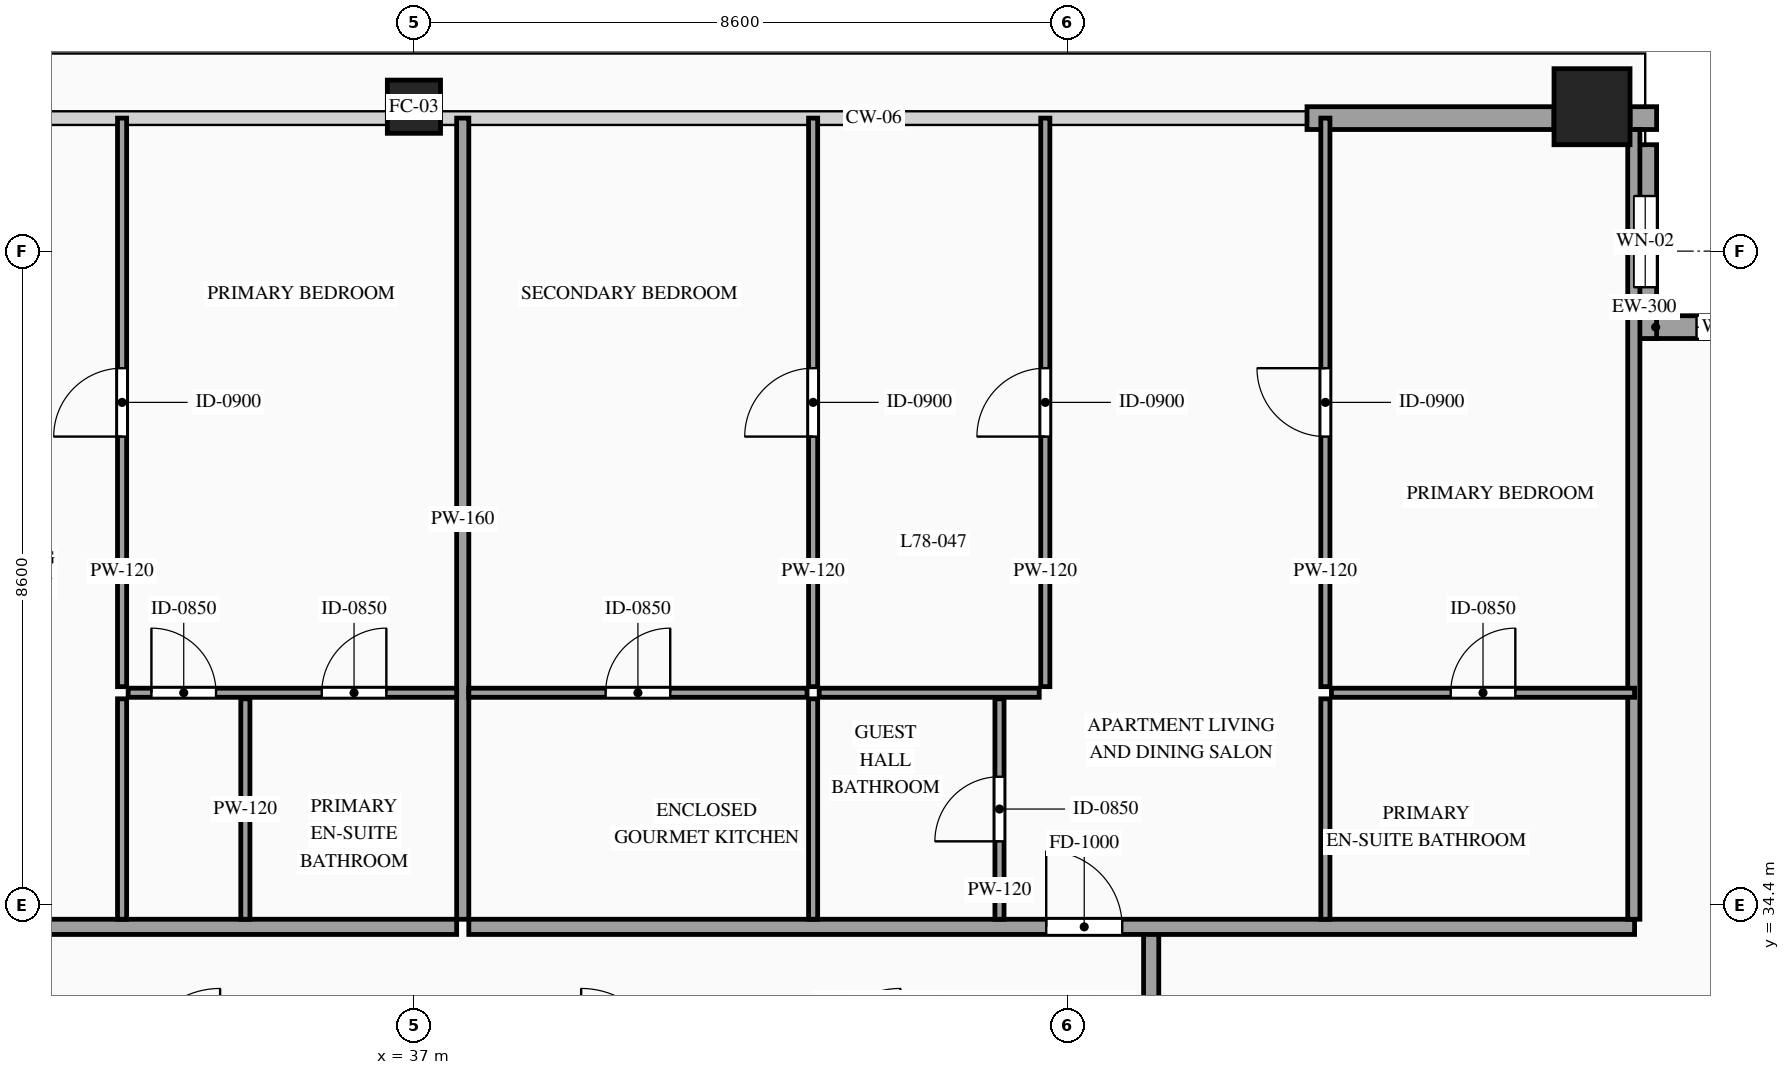
"""IFC4 building model, lengths in metres.
Left out: names, types, materials, properties, quantities, classifications, styles, units other than length and angle.
Written with IfcOpenShell. Run it as: python <this file> out.ifc"""

import sys

from ifc_helpers import new_model, si_unit, direction, frame, frame_2d, origin, origin_2d, place, context, subcontext, project, spatial, rectangle, hollow_rectangle, extrude, source, transform, mapped, element, fill, save


model = new_model("IFC4")
c1 = context("Model", 3, precision=1e-05, world=origin(), true_north=direction((0.0, 1.0)))
c2 = subcontext(c1, "Body", "Model", "MODEL_VIEW")
j1 = project(units=[si_unit("LENGTHUNIT", "METRE"), si_unit("PLANEANGLEUNIT", "RADIAN")], contexts=[c1])
p1 = place(None, origin())
s1 = spatial("IfcSite", under=j1, at=p1, CompositionType="ELEMENT")
p2 = place(p1, origin())
s2 = spatial("IfcBuilding", under=s1, at=p2, CompositionType="ELEMENT")
p3 = place(p2, frame((0.0, 0.0, 292.6)))
s3 = spatial("IfcBuildingStorey", under=s2, at=p3, CompositionType="ELEMENT", Elevation=292.6)
m1 = source(origin(), c2, "Body", "SweptSolid", [
    extrude(hollow_rectangle(XDim=0.7, YDim=0.7, WallThickness=0.032, at=origin_2d()), origin(), (0.0, 0.0, 1.0), 3.5),
])
p4 = place(p3, frame((37.0, 44.9, 0.0), z_axis=(0.0, 0.0, 1.0), x_axis=(1.0, 0.0, 0.0)))
e1 = element("IfcColumn", 1, at=p4, inside=s3, PredefinedType="COLUMN", context=c2, shape_type="MappedRepresentation", body=[
    mapped(m1, transform((0.0, 0.0, 0.0), scale=1.0)),
])
m2 = source(origin(), c2, "Body", "SweptSolid", [
    extrude(hollow_rectangle(XDim=1.0, YDim=1.0, WallThickness=0.048, at=origin_2d()), origin(), (0.0, 0.0, 1.0), 3.5),
])
p5 = place(p3, frame((52.5, 44.9, 0.0), z_axis=(0.0, 0.0, 1.0), x_axis=(1.0, 0.0, 0.0)))
e2 = element("IfcColumn", 2, at=p5, inside=s3, PredefinedType="COLUMN", context=c2, shape_type="MappedRepresentation", body=[
    mapped(m2, transform((0.0, 0.0, 0.0), scale=1.0)),
])
p6 = place(p3, frame((55.6, 42.0, 0.0), z_axis=(0.0, 0.0, 1.0), x_axis=(-1.0, 0.0, 0.0)))
e3 = element("IfcWall", 3, at=p6, inside=s3, PredefinedType="SOLIDWALL", context=c2, shape_type="SweptSolid", body=[
    extrude(rectangle(XDim=2.55, YDim=0.3, at=frame_2d((1.275, 0.0))), origin(), (0.0, 0.0, 1.0), 3.28),
])
p7 = place(p6, frame((0.825, 0.0, 0.85)))
e4 = element("IfcOpeningElement", 4, at=p7, cuts=e3, PredefinedType="OPENING", context=c2, shape_type="SweptSolid", body=[
    extrude(rectangle(XDim=0.9, YDim=1.5, at=frame_2d((0.45, 0.75))), frame((0.0, 0.165, 0.0), z_axis=(0.0, -1.0, 0.0), x_axis=(1.0, 0.0, 0.0)), (0.0, 0.0, 1.0), 0.33),
])
p8 = place(p3, frame((53.2, 41.85, 0.0), z_axis=(0.0, 0.0, 1.0), x_axis=(0.0, 1.0, 0.0)))
e5 = element("IfcWall", 5, at=p8, inside=s3, PredefinedType="SOLIDWALL", context=c2, shape_type="SweptSolid", body=[
    extrude(rectangle(XDim=2.55, YDim=0.3, at=frame_2d((1.275, 0.0))), origin(), (0.0, 0.0, 1.0), 3.28),
])
p9 = place(p8, frame((0.675, 0.0, 0.85)))
e6 = element("IfcOpeningElement", 6, at=p9, cuts=e5, PredefinedType="OPENING", context=c2, shape_type="SweptSolid", body=[
    extrude(rectangle(XDim=1.2, YDim=2.1, at=frame_2d((0.6, 1.05))), frame((0.0, 0.165, 0.0), z_axis=(0.0, -1.0, 0.0), x_axis=(1.0, 0.0, 0.0)), (0.0, 0.0, 1.0), 0.33),
])
m3 = source(origin(), c2, "Body", "SweptSolid", [
    extrude(rectangle(XDim=0.35, YDim=0.3, at=frame_2d((0.175, 0.0))), origin(), (0.0, 0.0, 1.0), 3.28),
])
p10 = place(p3, frame((53.0, 44.75, 0.0), z_axis=(0.0, 0.0, 1.0), x_axis=(1.0, 0.0, 0.0)))
e7 = element("IfcWall", 7, at=p10, inside=s3, PredefinedType="SOLIDWALL", context=c2, shape_type="MappedRepresentation", body=[
    mapped(m3, transform((0.0, 0.0, 0.0), scale=1.0)),
])
m4 = source(origin(), c2, "Body", "SweptSolid", [
    extrude(rectangle(XDim=3.25, YDim=0.3, at=frame_2d((1.625, 0.0))), origin(), (0.0, 0.0, 1.0), 2.885),
])
p11 = place(p3, frame((48.75, 44.75, 0.0), z_axis=(0.0, 0.0, 1.0), x_axis=(1.0, 0.0, 0.0)))
e8 = element("IfcWall", 8, at=p11, inside=s3, PredefinedType="SOLIDWALL", context=c2, shape_type="MappedRepresentation", body=[
    mapped(m4, transform((0.0, 0.0, 0.0), scale=1.0)),
])
m5 = source(origin(), c2, "Body", "SweptSolid", [
    extrude(rectangle(XDim=1.7, YDim=0.2, at=frame_2d((0.85, 0.0))), origin(), (0.0, 0.0, 1.0), 3.28),
])
p12 = place(p3, frame((46.7, 32.35, 0.0), z_axis=(0.0, 0.0, 1.0), x_axis=(0.0, 1.0, 0.0)))
e9 = element("IfcWall", 9, at=p12, inside=s3, PredefinedType="PARTITIONING", context=c2, shape_type="MappedRepresentation", body=[
    mapped(m5, transform((0.0, 0.0, 0.0), scale=1.0)),
])
p13 = place(p3, frame((20.94, 34.11, 0.0), z_axis=(0.0, 0.0, 1.0), x_axis=(1.0, 0.0, 0.0)))
e10 = element("IfcWall", 10, at=p13, inside=s3, PredefinedType="PARTITIONING", context=c2, shape_type="SweptSolid", body=[
    extrude(rectangle(XDim=16.622, YDim=0.2, at=frame_2d((8.311, 0.0))), origin(), (0.0, 0.0, 1.0), 3.28),
])
p14 = place(p13, frame((9.611, 0.0, 0.0)))
e11 = element("IfcOpeningElement", 11, at=p14, cuts=e10, PredefinedType="OPENING", context=c2, shape_type="SweptSolid", body=[
    extrude(rectangle(XDim=1.0, YDim=2.2, at=frame_2d((0.5, 1.1))), frame((0.0, 0.115, 0.0), z_axis=(0.0, -1.0, 0.0), x_axis=(1.0, 0.0, 0.0)), (0.0, 0.0, 1.0), 0.23),
])
m6 = source(origin(), c2, "Body", "SweptSolid", [
    extrude(rectangle(XDim=10.54, YDim=0.16, at=frame_2d((5.27, 0.0))), origin(), (0.0, 0.0, 1.0), 3.28),
])
p15 = place(p3, frame((37.642, 34.21, 0.0), z_axis=(0.0, 0.0, 1.0), x_axis=(0.0, 1.0, 0.0)))
e12 = element("IfcWall", 12, at=p15, inside=s3, PredefinedType="PARTITIONING", context=c2, shape_type="MappedRepresentation", body=[
    mapped(m6, transform((0.0, 0.0, 0.0), scale=1.0)),
])
m7 = source(origin(), c2, "Body", "SweptSolid", [
    extrude(rectangle(XDim=2.9, YDim=0.12, at=frame_2d((1.45, 0.0))), origin(), (0.0, 0.0, 1.0), 3.28),
])
for number, where, z_axis, x_axis in (
    (13, (34.782, 34.21, 0.0), (0.0, 0.0, 1.0), (0.0, 1.0, 0.0)),
    (14, (33.16, 34.21, 0.0), (0.0, 0.0, 1.0), (0.0, 1.0, 0.0)),
):
    element("IfcWall", number, at=place(p3, frame(where, z_axis=z_axis, x_axis=x_axis)), inside=s3, PredefinedType="PARTITIONING", context=c2, shape_type="MappedRepresentation", body=[
        mapped(m7, transform((0.0, 0.0, 0.0), scale=1.0)),
    ])
p16 = place(p3, frame((33.24, 37.19, 0.0), z_axis=(0.0, 0.0, 1.0), x_axis=(1.0, 0.0, 0.0)))
e15 = element("IfcWall", 15, at=p16, inside=s3, PredefinedType="PARTITIONING", context=c2, shape_type="SweptSolid", body=[
    extrude(rectangle(XDim=4.322, YDim=0.12, at=frame_2d((2.161, 0.0))), origin(), (0.0, 0.0, 1.0), 3.28),
])
p17 = place(p16, frame((2.547, 0.0, 0.0)))
e16 = element("IfcOpeningElement", 16, at=p17, cuts=e15, PredefinedType="OPENING", context=c2, shape_type="SweptSolid", body=[
    extrude(rectangle(XDim=0.85, YDim=2.1, at=frame_2d((0.425, 1.05))), frame((0.0, 0.075, 0.0), z_axis=(0.0, -1.0, 0.0), x_axis=(1.0, 0.0, 0.0)), (0.0, 0.0, 1.0), 0.15),
])
p18 = place(p16, frame((0.306, 0.0, 0.0)))
e17 = element("IfcOpeningElement", 17, at=p18, cuts=e15, PredefinedType="OPENING", context=c2, shape_type="SweptSolid", body=[
    extrude(rectangle(XDim=0.85, YDim=2.1, at=frame_2d((0.425, 1.05))), frame((0.0, 0.075, 0.0), z_axis=(0.0, -1.0, 0.0), x_axis=(1.0, 0.0, 0.0)), (0.0, 0.0, 1.0), 0.15),
])
p19 = place(p3, frame((33.16, 37.27, 0.0), z_axis=(0.0, 0.0, 1.0), x_axis=(0.0, 1.0, 0.0)))
e18 = element("IfcWall", 18, at=p19, inside=s3, PredefinedType="PARTITIONING", context=c2, shape_type="SweptSolid", body=[
    extrude(rectangle(XDim=7.48, YDim=0.12, at=frame_2d((3.74, 0.0))), origin(), (0.0, 0.0, 1.0), 3.28),
])
p20 = place(p19, frame((3.29, 0.0, 0.0)))
e19 = element("IfcOpeningElement", 19, at=p20, cuts=e18, PredefinedType="OPENING", context=c2, shape_type="SweptSolid", body=[
    extrude(rectangle(XDim=0.9, YDim=2.15, at=frame_2d((0.45, 1.075))), frame((0.0, 0.075, 0.0), z_axis=(0.0, -1.0, 0.0), x_axis=(1.0, 0.0, 0.0)), (0.0, 0.0, 1.0), 0.15),
])
p21 = place(p3, frame((37.722, 34.11, 0.0), z_axis=(0.0, 0.0, 1.0), x_axis=(1.0, 0.0, 0.0)))
e20 = element("IfcWall", 20, at=p21, inside=s3, PredefinedType="PARTITIONING", context=c2, shape_type="SweptSolid", body=[
    extrude(rectangle(XDim=15.338, YDim=0.2, at=frame_2d((7.669, 0.0))), origin(), (0.0, 0.0, 1.0), 3.28),
])
p22 = place(p21, frame((7.597, 0.0, 0.0)))
e21 = element("IfcOpeningElement", 21, at=p22, cuts=e20, PredefinedType="OPENING", context=c2, shape_type="SweptSolid", body=[
    extrude(rectangle(XDim=1.0, YDim=2.2, at=frame_2d((0.5, 1.1))), frame((0.0, 0.115, 0.0), z_axis=(0.0, -1.0, 0.0), x_axis=(1.0, 0.0, 0.0)), (0.0, 0.0, 1.0), 0.23),
])
m8 = source(origin(), c2, "Body", "SweptSolid", [
    extrude(rectangle(XDim=10.39, YDim=0.16, at=frame_2d((5.195, 0.0))), origin(), (0.0, 0.0, 1.0), 3.28),
])
p23 = place(p3, frame((53.05, 34.21, 0.0), z_axis=(0.0, 0.0, 1.0), x_axis=(0.0, 1.0, 0.0)))
e22 = element("IfcWall", 22, at=p23, inside=s3, PredefinedType="PARTITIONING", context=c2, shape_type="MappedRepresentation", body=[
    mapped(m8, transform((0.0, 0.0, 0.0), scale=1.0)),
])
p24 = place(p3, frame((37.722, 37.19, 0.0), z_axis=(0.0, 0.0, 1.0), x_axis=(1.0, 0.0, 0.0)))
e23 = element("IfcWall", 23, at=p24, inside=s3, PredefinedType="PARTITIONING", context=c2, shape_type="SweptSolid", body=[
    extrude(rectangle(XDim=4.45, YDim=0.12, at=frame_2d((2.225, 0.0))), origin(), (0.0, 0.0, 1.0), 3.28),
])
p25 = place(p24, frame((1.8, 0.0, 0.0)))
e24 = element("IfcOpeningElement", 24, at=p25, cuts=e23, PredefinedType="OPENING", context=c2, shape_type="SweptSolid", body=[
    extrude(rectangle(XDim=0.85, YDim=2.1, at=frame_2d((0.425, 1.05))), frame((0.0, 0.075, 0.0), z_axis=(0.0, -1.0, 0.0), x_axis=(1.0, 0.0, 0.0)), (0.0, 0.0, 1.0), 0.15),
])
p26 = place(p3, frame((42.252, 34.21, 0.0), z_axis=(0.0, 0.0, 1.0), x_axis=(0.0, 1.0, 0.0)))
e25 = element("IfcWall", 25, at=p26, inside=s3, PredefinedType="PARTITIONING", context=c2, shape_type="MappedRepresentation", body=[
    mapped(m7, transform((0.0, 0.0, 0.0), scale=1.0)),
])
p27 = place(p3, frame((44.704, 34.21, 0.0), z_axis=(0.0, 0.0, 1.0), x_axis=(0.0, 1.0, 0.0)))
e26 = element("IfcWall", 26, at=p27, inside=s3, PredefinedType="PARTITIONING", context=c2, shape_type="SweptSolid", body=[
    extrude(rectangle(XDim=2.9, YDim=0.12, at=frame_2d((1.45, 0.0))), origin(), (0.0, 0.0, 1.0), 3.28),
])
p28 = place(p27, frame((1.025, 0.0, 0.0)))
e27 = element("IfcOpeningElement", 27, at=p28, cuts=e26, PredefinedType="OPENING", context=c2, shape_type="SweptSolid", body=[
    extrude(rectangle(XDim=0.85, YDim=2.1, at=frame_2d((0.425, 1.05))), frame((0.0, 0.075, 0.0), z_axis=(0.0, -1.0, 0.0), x_axis=(1.0, 0.0, 0.0)), (0.0, 0.0, 1.0), 0.15),
])
p29 = place(p3, frame((49.072, 37.19, 0.0), z_axis=(0.0, 0.0, 1.0), x_axis=(1.0, 0.0, 0.0)))
e28 = element("IfcWall", 28, at=p29, inside=s3, PredefinedType="PARTITIONING", context=c2, shape_type="SweptSolid", body=[
    extrude(rectangle(XDim=3.988, YDim=0.12, at=frame_2d((1.994, 0.0))), origin(), (0.0, 0.0, 1.0), 3.28),
])
p30 = place(p29, frame((1.569, 0.0, 0.0)))
e29 = element("IfcOpeningElement", 29, at=p30, cuts=e28, PredefinedType="OPENING", context=c2, shape_type="SweptSolid", body=[
    extrude(rectangle(XDim=0.85, YDim=2.1, at=frame_2d((0.425, 1.05))), frame((0.0, 0.075, 0.0), z_axis=(0.0, -1.0, 0.0), x_axis=(1.0, 0.0, 0.0)), (0.0, 0.0, 1.0), 0.15),
])
p31 = place(p3, frame((48.992, 34.21, 0.0), z_axis=(0.0, 0.0, 1.0), x_axis=(0.0, 1.0, 0.0)))
e30 = element("IfcWall", 30, at=p31, inside=s3, PredefinedType="PARTITIONING", context=c2, shape_type="MappedRepresentation", body=[
    mapped(m7, transform((0.0, 0.0, 0.0), scale=1.0)),
])
p32 = place(p3, frame((42.252, 37.27, 0.0), z_axis=(0.0, 0.0, 1.0), x_axis=(0.0, 1.0, 0.0)))
e31 = element("IfcWall", 31, at=p32, inside=s3, PredefinedType="PARTITIONING", context=c2, shape_type="SweptSolid", body=[
    extrude(rectangle(XDim=7.48, YDim=0.12, at=frame_2d((3.74, 0.0))), origin(), (0.0, 0.0, 1.0), 3.28),
])
p33 = place(p32, frame((3.29, 0.0, 0.0)))
e32 = element("IfcOpeningElement", 32, at=p33, cuts=e31, PredefinedType="OPENING", context=c2, shape_type="SweptSolid", body=[
    extrude(rectangle(XDim=0.9, YDim=2.15, at=frame_2d((0.45, 1.075))), frame((0.0, 0.075, 0.0), z_axis=(0.0, -1.0, 0.0), x_axis=(1.0, 0.0, 0.0)), (0.0, 0.0, 1.0), 0.15),
])
p34 = place(p3, frame((48.992, 37.27, 0.0), z_axis=(0.0, 0.0, 1.0), x_axis=(0.0, 1.0, 0.0)))
e33 = element("IfcWall", 33, at=p34, inside=s3, PredefinedType="PARTITIONING", context=c2, shape_type="SweptSolid", body=[
    extrude(rectangle(XDim=7.48, YDim=0.12, at=frame_2d((3.74, 0.0))), origin(), (0.0, 0.0, 1.0), 3.28),
])
p35 = place(p34, frame((3.29, 0.0, 0.0)))
e34 = element("IfcOpeningElement", 34, at=p35, cuts=e33, PredefinedType="OPENING", context=c2, shape_type="SweptSolid", body=[
    extrude(rectangle(XDim=0.9, YDim=2.15, at=frame_2d((0.45, 1.075))), frame((0.0, 0.075, 0.0), z_axis=(0.0, -1.0, 0.0), x_axis=(1.0, 0.0, 0.0)), (0.0, 0.0, 1.0), 0.15),
])
m9 = source(origin(), c2, "Body", "SweptSolid", [
    extrude(rectangle(XDim=2.895, YDim=0.12, at=frame_2d((1.448, 0.0))), origin(), (0.0, 0.0, 1.0), 3.28),
])
p36 = place(p3, frame((42.332, 37.19, 0.0), z_axis=(0.0, 0.0, 1.0), x_axis=(1.0, 0.0, 0.0)))
e35 = element("IfcWall", 35, at=p36, inside=s3, PredefinedType="PARTITIONING", context=c2, shape_type="MappedRepresentation", body=[
    mapped(m9, transform((0.0, 0.0, 0.0), scale=1.0)),
])
p37 = place(p3, frame((45.307, 37.27, 0.0), z_axis=(0.0, 0.0, 1.0), x_axis=(0.0, 1.0, 0.0)))
e36 = element("IfcWall", 36, at=p37, inside=s3, PredefinedType="PARTITIONING", context=c2, shape_type="SweptSolid", body=[
    extrude(rectangle(XDim=7.48, YDim=0.12, at=frame_2d((3.74, 0.0))), origin(), (0.0, 0.0, 1.0), 3.28),
])
p38 = place(p37, frame((3.29, 0.0, 0.0)))
e37 = element("IfcOpeningElement", 37, at=p38, cuts=e36, PredefinedType="OPENING", context=c2, shape_type="SweptSolid", body=[
    extrude(rectangle(XDim=0.9, YDim=2.15, at=frame_2d((0.45, 1.075))), frame((0.0, 0.075, 0.0), z_axis=(0.0, -1.0, 0.0), x_axis=(1.0, 0.0, 0.0)), (0.0, 0.0, 1.0), 0.15),
])
m10 = source(origin(), c2, "Body", "SweptSolid", [
    extrude(rectangle(XDim=0.9, YDim=1.5, at=frame_2d((0.45, 0.75))), frame((0.0, 0.03, 0.0), z_axis=(0.0, -1.0, 0.0), x_axis=(1.0, 0.0, 0.0)), (0.0, 0.0, 1.0), 0.06),
])
p39 = place(p7, origin())
e38 = element("IfcWindow", 38, at=p39, inside=s3, PartitioningType="SINGLE_PANEL", PredefinedType="WINDOW", context=c2, shape_type="MappedRepresentation", body=[
    mapped(m10, transform((0.0, 0.0, 0.0), scale=1.0)),
])
fill(e4, e38)
m11 = source(origin(), c2, "Body", "SweptSolid", [
    extrude(rectangle(XDim=1.2, YDim=2.1, at=frame_2d((0.6, 1.05))), frame((0.0, 0.03, 0.0), z_axis=(0.0, -1.0, 0.0), x_axis=(1.0, 0.0, 0.0)), (0.0, 0.0, 1.0), 0.06),
])
p40 = place(p9, origin())
e39 = element("IfcWindow", 39, at=p40, inside=s3, PartitioningType="SINGLE_PANEL", PredefinedType="WINDOW", context=c2, shape_type="MappedRepresentation", body=[
    mapped(m11, transform((0.0, 0.0, 0.0), scale=1.0)),
])
fill(e6, e39)
m12 = source(origin(), c2, "Body", "SweptSolid", [
    extrude(rectangle(XDim=0.85, YDim=2.1, at=frame_2d((0.425, 1.05))), frame((0.0, 0.025, 0.0), z_axis=(0.0, -1.0, 0.0), x_axis=(1.0, 0.0, 0.0)), (0.0, 0.0, 1.0), 0.05),
])
p41 = place(p17, origin())
e40 = element("IfcDoor", 40, at=p41, inside=s3, OperationType="SINGLE_SWING_RIGHT", PredefinedType="DOOR", context=c2, shape_type="MappedRepresentation", body=[
    mapped(m12, transform((0.0, 0.0, 0.0), scale=1.0)),
])
fill(e16, e40)
p42 = place(p18, origin())
e41 = element("IfcDoor", 41, at=p42, inside=s3, OperationType="SINGLE_SWING_LEFT", PredefinedType="DOOR", context=c2, shape_type="MappedRepresentation", body=[
    mapped(m12, transform((0.0, 0.0, 0.0), scale=1.0)),
])
fill(e17, e41)
m13 = source(origin(), c2, "Body", "SweptSolid", [
    extrude(rectangle(XDim=0.9, YDim=2.15, at=frame_2d((0.45, 1.075))), frame((0.0, 0.025, 0.0), z_axis=(0.0, -1.0, 0.0), x_axis=(1.0, 0.0, 0.0)), (0.0, 0.0, 1.0), 0.05),
])
p43 = place(p20, origin())
e42 = element("IfcDoor", 42, at=p43, inside=s3, OperationType="SINGLE_SWING_LEFT", PredefinedType="DOOR", context=c2, shape_type="MappedRepresentation", body=[
    mapped(m13, transform((0.0, 0.0, 0.0), scale=1.0)),
])
fill(e19, e42)
m14 = source(origin(), c2, "Body", "SweptSolid", [
    extrude(rectangle(XDim=1.0, YDim=2.2, at=frame_2d((0.5, 1.1))), frame((0.0, 0.025, 0.0), z_axis=(0.0, -1.0, 0.0), x_axis=(1.0, 0.0, 0.0)), (0.0, 0.0, 1.0), 0.05),
])
p44 = place(p22, origin())
e43 = element("IfcDoor", 43, at=p44, inside=s3, OperationType="SINGLE_SWING_LEFT", PredefinedType="DOOR", context=c2, shape_type="MappedRepresentation", body=[
    mapped(m14, transform((0.0, 0.0, 0.0), scale=1.0)),
])
fill(e21, e43)
p45 = place(p25, origin())
e44 = element("IfcDoor", 44, at=p45, inside=s3, OperationType="SINGLE_SWING_RIGHT", PredefinedType="DOOR", context=c2, shape_type="MappedRepresentation", body=[
    mapped(m12, transform((0.0, 0.0, 0.0), scale=1.0)),
])
fill(e24, e44)
p46 = place(p28, origin())
e45 = element("IfcDoor", 45, at=p46, inside=s3, OperationType="SINGLE_SWING_LEFT", PredefinedType="DOOR", context=c2, shape_type="MappedRepresentation", body=[
    mapped(m12, transform((0.0, 0.0, 0.0), scale=1.0)),
])
fill(e27, e45)
p47 = place(p30, origin())
e46 = element("IfcDoor", 46, at=p47, inside=s3, OperationType="SINGLE_SWING_RIGHT", PredefinedType="DOOR", context=c2, shape_type="MappedRepresentation", body=[
    mapped(m12, transform((0.0, 0.0, 0.0), scale=1.0)),
])
fill(e29, e46)
p48 = place(p33, origin())
e47 = element("IfcDoor", 47, at=p48, inside=s3, OperationType="SINGLE_SWING_LEFT", PredefinedType="DOOR", context=c2, shape_type="MappedRepresentation", body=[
    mapped(m13, transform((0.0, 0.0, 0.0), scale=1.0)),
])
fill(e32, e47)
p49 = place(p35, origin())
e48 = element("IfcDoor", 48, at=p49, inside=s3, OperationType="SINGLE_SWING_RIGHT", PredefinedType="DOOR", context=c2, shape_type="MappedRepresentation", body=[
    mapped(m13, transform((0.0, 0.0, 0.0), scale=1.0)),
])
fill(e34, e48)
p50 = place(p38, origin())
e49 = element("IfcDoor", 49, at=p50, inside=s3, OperationType="SINGLE_SWING_LEFT", PredefinedType="DOOR", context=c2, shape_type="MappedRepresentation", body=[
    mapped(m13, transform((0.0, 0.0, 0.0), scale=1.0)),
])
fill(e37, e49)
save(model, sys.argv[1])
